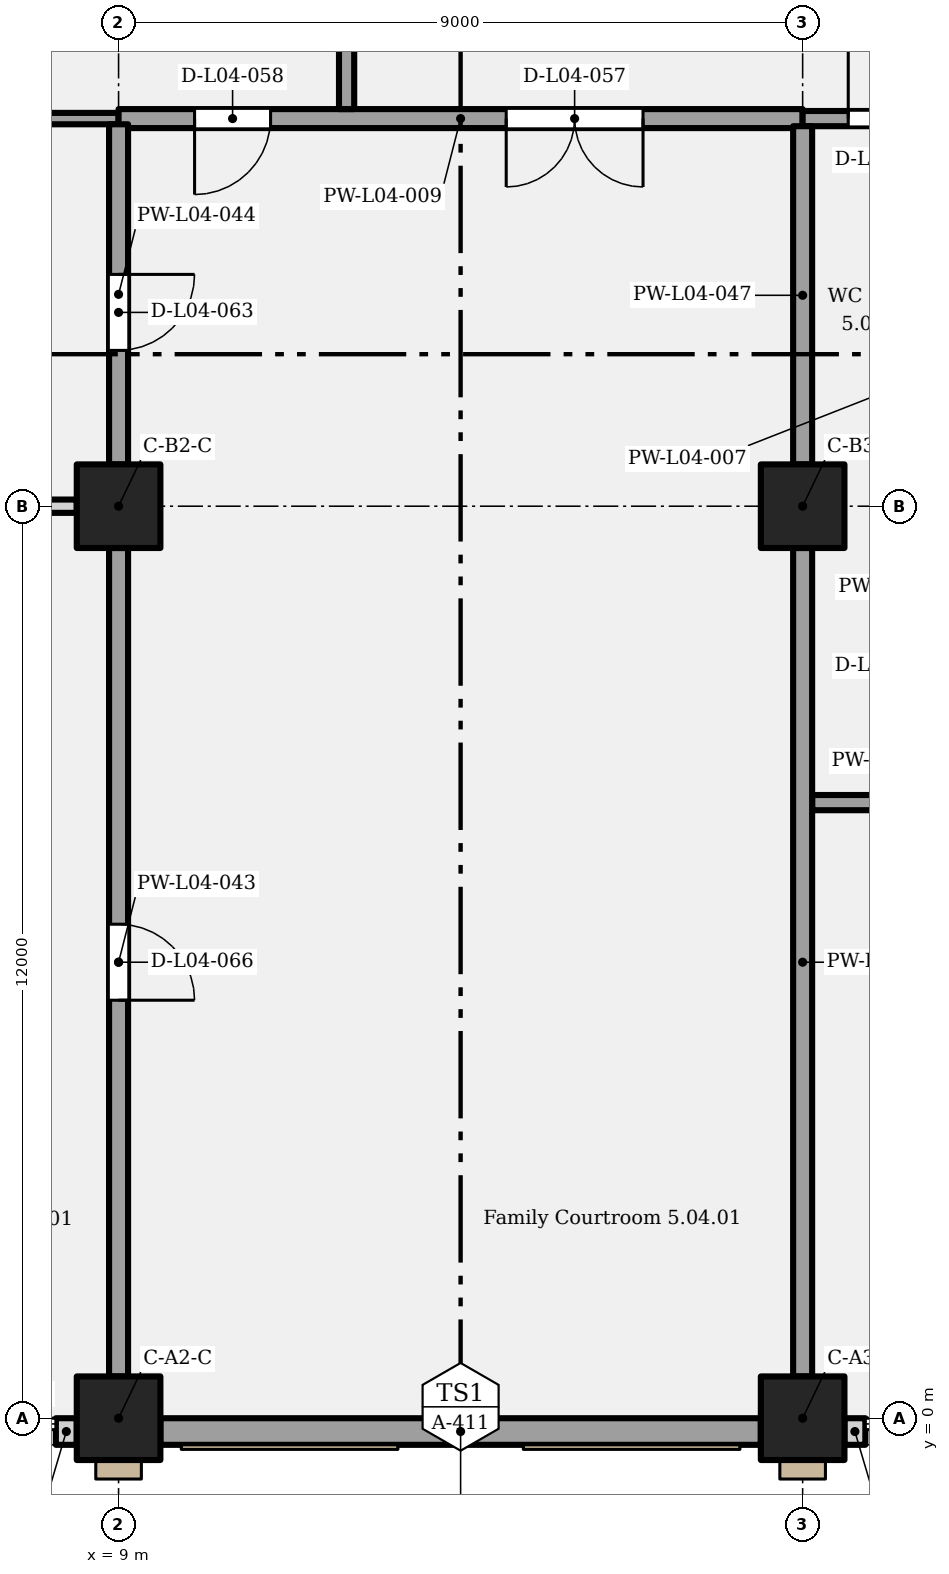
"""IFC4 building model, lengths in metres.
Left out: names, types, materials, properties, quantities, classifications, styles, units other than length and angle.
Written with IfcOpenShell. Run it as: python <this file> out.ifc"""

import sys

from ifc_helpers import new_model, si_unit, direction, frame, frame_2d, origin, origin_2d, place, context, subcontext, project, spatial, rectangle, extrude, element, fill, save


model = new_model("IFC4")
c1 = context("Model", 3, precision=1e-05, world=origin(), true_north=direction((0.0, 1.0)))
c2 = subcontext(c1, "Body", "Model", "MODEL_VIEW")
j1 = project(units=[si_unit("LENGTHUNIT", "METRE"), si_unit("PLANEANGLEUNIT", "RADIAN")], contexts=[c1])
p1 = place(None, origin())
s1 = spatial("IfcSite", under=j1, at=p1, CompositionType="ELEMENT")
p2 = place(p1, origin())
s2 = spatial("IfcBuilding", under=s1, at=p2, CompositionType="ELEMENT")
p3 = place(p2, frame((0.0, 0.0, 22.8)))
s3 = spatial("IfcBuildingStorey", under=s2, at=p3, CompositionType="ELEMENT", Elevation=22.8)
for number, where, z_axis, x_axis in (
    (1, (9.0, 0.0, 0.0), (0.0, 0.0, 1.0), (1.0, 0.0, 0.0)),
    (2, (18.0, 0.0, 0.0), (0.0, 0.0, 1.0), (1.0, 0.0, 0.0)),
    (3, (9.0, 12.0, 0.0), (0.0, 0.0, 1.0), (1.0, 0.0, 0.0)),
    (4, (18.0, 12.0, 0.0), (0.0, 0.0, 1.0), (1.0, 0.0, 0.0)),
):
    element("IfcColumn", number, at=place(p3, frame(where, z_axis=z_axis, x_axis=x_axis)), inside=s3, PredefinedType="COLUMN", context=c2, shape_type="SweptSolid", body=[
        extrude(rectangle(XDim=1.1, YDim=1.1, at=origin_2d()), origin(), (0.0, 0.0, 1.0), 5.4),
    ])
p4 = place(p3, frame((8.175, -0.175, 0.0), z_axis=(0.0, 0.0, 1.0), x_axis=(1.0, 0.0, 0.0)))
e5 = element("IfcWall", 5, at=p4, inside=s3, PredefinedType="SOLIDWALL", context=c2, shape_type="SweptSolid", body=[
    extrude(rectangle(XDim=0.275, YDim=0.35, at=frame_2d((0.137, 0.0))), origin(), (0.0, 0.0, 1.0), 5.15),
])
p5 = place(p3, frame((9.55, -0.175, 0.0), z_axis=(0.0, 0.0, 1.0), x_axis=(1.0, 0.0, 0.0)))
e6 = element("IfcWall", 6, at=p5, inside=s3, PredefinedType="SOLIDWALL", context=c2, shape_type="SweptSolid", body=[
    extrude(rectangle(XDim=7.9, YDim=0.35, at=frame_2d((3.95, 0.0))), origin(), (0.0, 0.0, 1.0), 5.15),
])
p6 = place(p3, frame((18.55, -0.175, 0.0), z_axis=(0.0, 0.0, 1.0), x_axis=(1.0, 0.0, 0.0)))
e7 = element("IfcWall", 7, at=p6, inside=s3, PredefinedType="SOLIDWALL", context=c2, shape_type="SweptSolid", body=[
    extrude(rectangle(XDim=0.275, YDim=0.35, at=frame_2d((0.137, 0.0))), origin(), (0.0, 0.0, 1.0), 5.15),
])
p7 = place(p3, frame((18.125, 8.1, 0.0), z_axis=(0.0, 0.0, 1.0), x_axis=(1.0, 0.0, 0.0)))
e8 = element("IfcWall", 8, at=p7, inside=s3, PredefinedType="PARTITIONING", context=c2, shape_type="SweptSolid", body=[
    extrude(rectangle(XDim=2.075, YDim=0.2, at=frame_2d((1.038, 0.0))), origin(), (0.0, 0.0, 1.0), 5.15),
])
p8 = place(p3, frame((4.5, 12.0, 0.0), z_axis=(0.0, 0.0, 1.0), x_axis=(1.0, 0.0, 0.0)))
e9 = element("IfcWall", 9, at=p8, inside=s3, PredefinedType="PARTITIONING", context=c2, shape_type="SweptSolid", body=[
    extrude(rectangle(XDim=3.95, YDim=0.175, at=frame_2d((1.975, 0.0))), origin(), (0.0, 0.0, 1.0), 4.4),
])
p9 = place(p3, frame((-0.25, 17.1, 0.0), z_axis=(0.0, 0.0, 1.0), x_axis=(1.0, 0.0, 0.0)))
e10 = element("IfcWall", 10, at=p9, inside=s3, PredefinedType="PARTITIONING", context=c2, shape_type="SweptSolid", body=[
    extrude(rectangle(XDim=9.25, YDim=0.15, at=frame_2d((4.625, 0.0))), origin(), (0.0, 0.0, 1.0), 5.15),
])
p10 = place(p9, frame((3.0, 0.0, 0.0), z_axis=(0.0, 0.0, 1.0), x_axis=(-1.0, 0.0, 0.0)))
e11 = element("IfcOpeningElement", 11, at=p10, cuts=e10, PredefinedType="OPENING", context=c2, shape_type="SweptSolid", body=[
    extrude(rectangle(XDim=1.0, YDim=2.1, at=frame_2d((0.5, 1.05))), frame((0.0, 0.085, 0.0), z_axis=(0.0, -1.0, 0.0), x_axis=(1.0, 0.0, 0.0)), (0.0, 0.0, 1.0), 0.17),
])
p11 = place(p9, frame((7.5, 0.0, 0.0), z_axis=(0.0, 0.0, 1.0), x_axis=(-1.0, 0.0, 0.0)))
e12 = element("IfcOpeningElement", 12, at=p11, cuts=e10, PredefinedType="OPENING", context=c2, shape_type="SweptSolid", body=[
    extrude(rectangle(XDim=1.0, YDim=2.1, at=frame_2d((0.5, 1.05))), frame((0.0, 0.085, 0.0), z_axis=(0.0, -1.0, 0.0), x_axis=(1.0, 0.0, 0.0)), (0.0, 0.0, 1.0), 0.17),
])
p12 = place(p3, frame((9.0, 17.1, 0.0), z_axis=(0.0, 0.0, 1.0), x_axis=(1.0, 0.0, 0.0)))
e13 = element("IfcWall", 13, at=p12, inside=s3, PredefinedType="PARTITIONING", context=c2, shape_type="SweptSolid", body=[
    extrude(rectangle(XDim=9.0, YDim=0.25, at=frame_2d((4.5, 0.0))), origin(), (0.0, 0.0, 1.0), 5.15),
])
p13 = place(p12, frame((6.9, 0.0, 0.0), z_axis=(0.0, 0.0, 1.0), x_axis=(-1.0, 0.0, 0.0)))
e14 = element("IfcOpeningElement", 14, at=p13, cuts=e13, PredefinedType="OPENING", context=c2, shape_type="SweptSolid", body=[
    extrude(rectangle(XDim=1.8, YDim=2.4, at=frame_2d((0.9, 1.2))), frame((0.0, 0.135, 0.0), z_axis=(0.0, -1.0, 0.0), x_axis=(1.0, 0.0, 0.0)), (0.0, 0.0, 1.0), 0.27),
])
p14 = place(p12, frame((2.0, 0.0, 0.0), z_axis=(0.0, 0.0, 1.0), x_axis=(-1.0, 0.0, 0.0)))
e15 = element("IfcOpeningElement", 15, at=p14, cuts=e13, PredefinedType="OPENING", context=c2, shape_type="SweptSolid", body=[
    extrude(rectangle(XDim=1.0, YDim=2.1, at=frame_2d((0.5, 1.05))), frame((0.0, 0.135, 0.0), z_axis=(0.0, -1.0, 0.0), x_axis=(1.0, 0.0, 0.0)), (0.0, 0.0, 1.0), 0.27),
])
p15 = place(p3, frame((18.0, 17.1, 0.0), z_axis=(0.0, 0.0, 1.0), x_axis=(1.0, 0.0, 0.0)))
e16 = element("IfcWall", 16, at=p15, inside=s3, PredefinedType="PARTITIONING", context=c2, shape_type="SweptSolid", body=[
    extrude(rectangle(XDim=9.25, YDim=0.2, at=frame_2d((4.625, 0.0))), origin(), (0.0, 0.0, 1.0), 5.15),
])
p16 = place(p15, frame((7.25, 0.0, 0.0), z_axis=(0.0, 0.0, 1.0), x_axis=(-1.0, 0.0, 0.0)))
e17 = element("IfcOpeningElement", 17, at=p16, cuts=e16, PredefinedType="OPENING", context=c2, shape_type="SweptSolid", body=[
    extrude(rectangle(XDim=1.0, YDim=2.1, at=frame_2d((0.5, 1.05))), frame((0.0, 0.11, 0.0), z_axis=(0.0, -1.0, 0.0), x_axis=(1.0, 0.0, 0.0)), (0.0, 0.0, 1.0), 0.22),
])
p17 = place(p15, frame((0.6, 0.0, 0.0)))
e18 = element("IfcOpeningElement", 18, at=p17, cuts=e16, PredefinedType="OPENING", context=c2, shape_type="SweptSolid", body=[
    extrude(rectangle(XDim=1.0, YDim=2.1, at=frame_2d((0.5, 1.05))), frame((0.0, 0.11, 0.0), z_axis=(0.0, -1.0, 0.0), x_axis=(1.0, 0.0, 0.0)), (0.0, 0.0, 1.0), 0.22),
])
p18 = place(p3, frame((9.0, 0.55, 0.0), z_axis=(0.0, 0.0, 1.0), x_axis=(0.0, 1.0, 0.0)))
e19 = element("IfcWall", 19, at=p18, inside=s3, PredefinedType="PARTITIONING", context=c2, shape_type="SweptSolid", body=[
    extrude(rectangle(XDim=10.9, YDim=0.25, at=frame_2d((5.45, 0.0))), origin(), (0.0, 0.0, 1.0), 4.4),
])
p19 = place(p18, frame((5.95, 0.0, 0.0), z_axis=(0.0, 0.0, 1.0), x_axis=(-1.0, 0.0, 0.0)))
e20 = element("IfcOpeningElement", 20, at=p19, cuts=e19, PredefinedType="OPENING", context=c2, shape_type="SweptSolid", body=[
    extrude(rectangle(XDim=1.0, YDim=2.1, at=frame_2d((0.5, 1.05))), frame((0.0, 0.135, 0.0), z_axis=(0.0, -1.0, 0.0), x_axis=(1.0, 0.0, 0.0)), (0.0, 0.0, 1.0), 0.27),
])
p20 = place(p3, frame((9.0, 12.55, 0.0), z_axis=(0.0, 0.0, 1.0), x_axis=(0.0, 1.0, 0.0)))
e21 = element("IfcWall", 21, at=p20, inside=s3, PredefinedType="PARTITIONING", context=c2, shape_type="SweptSolid", body=[
    extrude(rectangle(XDim=4.475, YDim=0.25, at=frame_2d((2.237, 0.0))), origin(), (0.0, 0.0, 1.0), 4.2),
])
p21 = place(p20, frame((2.5, 0.0, 0.0), z_axis=(0.0, 0.0, 1.0), x_axis=(-1.0, 0.0, 0.0)))
e22 = element("IfcOpeningElement", 22, at=p21, cuts=e21, PredefinedType="OPENING", context=c2, shape_type="SweptSolid", body=[
    extrude(rectangle(XDim=1.0, YDim=2.1, at=frame_2d((0.5, 1.05))), frame((0.0, 0.135, 0.0), z_axis=(0.0, -1.0, 0.0), x_axis=(1.0, 0.0, 0.0)), (0.0, 0.0, 1.0), 0.27),
])
p22 = place(p3, frame((12.0, 17.225, 0.0), z_axis=(0.0, 0.0, 1.0), x_axis=(0.0, 1.0, 0.0)))
e23 = element("IfcWall", 23, at=p22, inside=s3, PredefinedType="PARTITIONING", context=c2, shape_type="SweptSolid", body=[
    extrude(rectangle(XDim=2.15, YDim=0.2, at=frame_2d((1.075, 0.0))), origin(), (0.0, 0.0, 1.0), 5.15),
])
p23 = place(p3, frame((18.0, 0.55, 0.0), z_axis=(0.0, 0.0, 1.0), x_axis=(0.0, 1.0, 0.0)))
e24 = element("IfcWall", 24, at=p23, inside=s3, PredefinedType="PARTITIONING", context=c2, shape_type="SweptSolid", body=[
    extrude(rectangle(XDim=10.9, YDim=0.25, at=frame_2d((5.45, 0.0))), origin(), (0.0, 0.0, 1.0), 4.4),
])
p24 = place(p3, frame((18.0, 12.55, 0.0), z_axis=(0.0, 0.0, 1.0), x_axis=(0.0, 1.0, 0.0)))
e25 = element("IfcWall", 25, at=p24, inside=s3, PredefinedType="PARTITIONING", context=c2, shape_type="SweptSolid", body=[
    extrude(rectangle(XDim=4.45, YDim=0.25, at=frame_2d((2.225, 0.0))), origin(), (0.0, 0.0, 1.0), 4.2),
])
p25 = place(p13, origin())
e26 = element("IfcDoor", 26, at=p25, inside=s3, OperationType="DOUBLE_DOOR_SINGLE_SWING", PredefinedType="DOOR", context=c2, shape_type="SweptSolid", body=[
    extrude(rectangle(XDim=1.8, YDim=2.4, at=frame_2d((0.9, 1.2))), frame((0.0, 0.025, 0.0), z_axis=(0.0, -1.0, 0.0), x_axis=(1.0, 0.0, 0.0)), (0.0, 0.0, 1.0), 0.05),
])
fill(e14, e26)
p26 = place(p14, origin())
e27 = element("IfcDoor", 27, at=p26, inside=s3, OperationType="SINGLE_SWING_RIGHT", PredefinedType="DOOR", context=c2, shape_type="SweptSolid", body=[
    extrude(rectangle(XDim=1.0, YDim=2.1, at=frame_2d((0.5, 1.05))), frame((0.0, 0.025, 0.0), z_axis=(0.0, -1.0, 0.0), x_axis=(1.0, 0.0, 0.0)), (0.0, 0.0, 1.0), 0.05),
])
fill(e15, e27)
p27 = place(p21, origin())
e28 = element("IfcDoor", 28, at=p27, inside=s3, OperationType="SINGLE_SWING_LEFT", PredefinedType="DOOR", context=c2, shape_type="SweptSolid", body=[
    extrude(rectangle(XDim=1.0, YDim=2.1, at=frame_2d((0.5, 1.05))), frame((0.0, 0.025, 0.0), z_axis=(0.0, -1.0, 0.0), x_axis=(1.0, 0.0, 0.0)), (0.0, 0.0, 1.0), 0.05),
])
fill(e22, e28)
p28 = place(p19, origin())
e29 = element("IfcDoor", 29, at=p28, inside=s3, OperationType="SINGLE_SWING_RIGHT", PredefinedType="DOOR", context=c2, shape_type="SweptSolid", body=[
    extrude(rectangle(XDim=1.0, YDim=2.1, at=frame_2d((0.5, 1.05))), frame((0.0, 0.025, 0.0), z_axis=(0.0, -1.0, 0.0), x_axis=(1.0, 0.0, 0.0)), (0.0, 0.0, 1.0), 0.05),
])
fill(e20, e29)
p29 = place(p17, origin())
e30 = element("IfcDoor", 30, at=p29, inside=s3, OperationType="SINGLE_SWING_LEFT", PredefinedType="DOOR", context=c2, shape_type="SweptSolid", body=[
    extrude(rectangle(XDim=1.0, YDim=2.1, at=frame_2d((0.5, 1.05))), frame((0.0, 0.025, 0.0), z_axis=(0.0, -1.0, 0.0), x_axis=(1.0, 0.0, 0.0)), (0.0, 0.0, 1.0), 0.05),
])
fill(e18, e30)
save(model, sys.argv[1])
